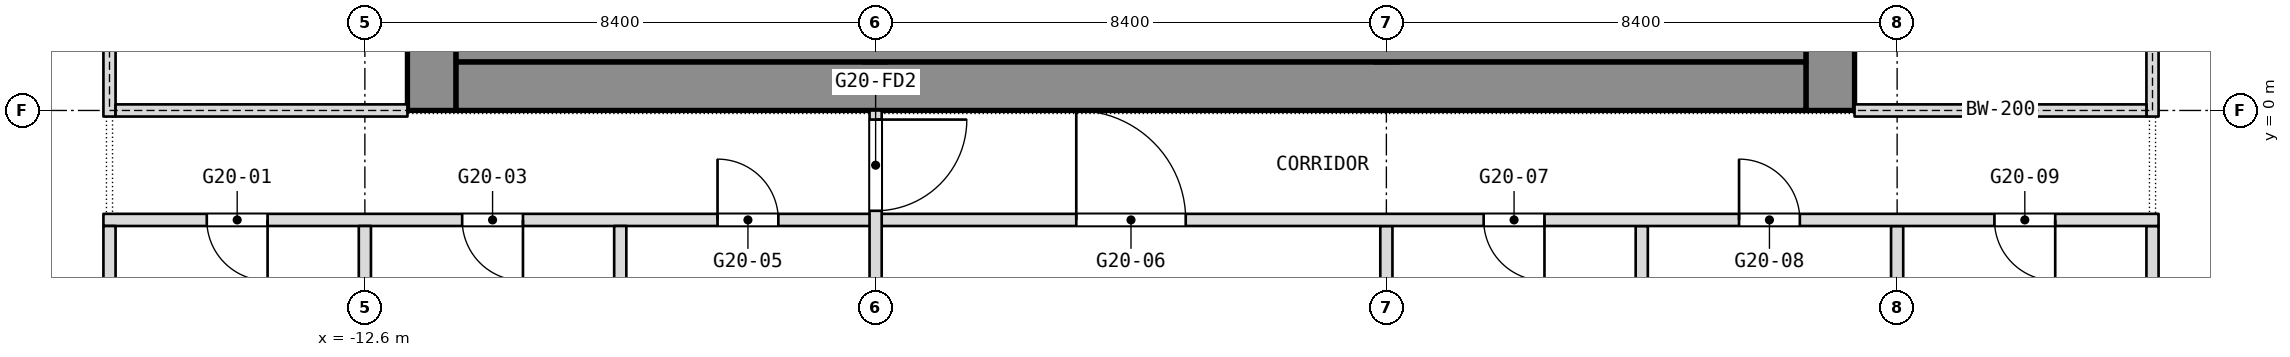
"""IFC4 building model, lengths in metres.
Left out: names, types, materials, properties, quantities, classifications, styles, units other than length and angle.
Written with IfcOpenShell. Run it as: python <this file> out.ifc"""

import sys

from ifc_helpers import new_model, si_unit, direction, frame, frame_2d, origin, place, context, subcontext, project, spatial, rectangle, extrude, element, fill, save


model = new_model("IFC4")
c1 = context("Model", 3, precision=1e-05, world=origin(), true_north=direction((0.0, 1.0)))
c2 = subcontext(c1, "Body", "Model", "MODEL_VIEW")
j1 = project(units=[si_unit("LENGTHUNIT", "METRE"), si_unit("PLANEANGLEUNIT", "RADIAN")], contexts=[c1])
p1 = place(None, origin())
s1 = spatial("IfcSite", under=j1, at=p1, CompositionType="ELEMENT")
p2 = place(p1, origin())
s2 = spatial("IfcBuilding", under=s1, at=p2, CompositionType="ELEMENT")
p3 = place(p2, frame((0.0, 0.0, 230.9)))
s3 = spatial("IfcBuildingStorey", under=s2, at=p3, CompositionType="ELEMENT", Elevation=230.9)
p4 = place(p3, frame((11.5, 0.0, 0.0), z_axis=(0.0, 0.0, 1.0), x_axis=(0.0, 1.0, 0.0)))
e1 = element("IfcWall", 1, at=p4, inside=s3, PredefinedType="SHEAR", context=c2, shape_type="SweptSolid", body=[
    extrude(rectangle(XDim=16.8, YDim=0.8, at=frame_2d((8.4, 0.0))), origin(), (0.0, 0.0, 1.0), 3.6),
])
p5 = place(p4, frame((2.3, 0.0, 0.0)))
e2 = element("IfcOpeningElement", 2, at=p5, cuts=e1, PredefinedType="OPENING", context=c2, shape_type="SweptSolid", body=[
    extrude(rectangle(XDim=1.1, YDim=2.1, at=frame_2d((0.55, 1.05))), frame((0.0, 0.4, 0.0), z_axis=(0.0, -1.0, 0.0), x_axis=(1.0, 0.0, 0.0)), (0.0, 0.0, 1.0), 0.8),
])
p6 = place(p4, frame((4.85, 0.0, 0.0)))
e3 = element("IfcOpeningElement", 3, at=p6, cuts=e1, PredefinedType="OPENING", context=c2, shape_type="SweptSolid", body=[
    extrude(rectangle(XDim=1.1, YDim=2.1, at=frame_2d((0.55, 1.05))), frame((0.0, 0.4, 0.0), z_axis=(0.0, -1.0, 0.0), x_axis=(1.0, 0.0, 0.0)), (0.0, 0.0, 1.0), 0.8),
])
p7 = place(p4, frame((6.825, 0.0, 0.0)))
e4 = element("IfcOpeningElement", 4, at=p7, cuts=e1, PredefinedType="OPENING", context=c2, shape_type="SweptSolid", body=[
    extrude(rectangle(XDim=1.2, YDim=2.1, at=frame_2d((0.6, 1.05))), frame((0.0, 0.4, 0.0), z_axis=(0.0, -1.0, 0.0), x_axis=(1.0, 0.0, 0.0)), (0.0, 0.0, 1.0), 0.8),
])
p8 = place(p4, frame((13.4, 0.0, 0.0)))
e5 = element("IfcOpeningElement", 5, at=p8, cuts=e1, PredefinedType="OPENING", context=c2, shape_type="SweptSolid", body=[
    extrude(rectangle(XDim=1.1, YDim=2.1, at=frame_2d((0.55, 1.05))), frame((0.0, 0.4, 0.0), z_axis=(0.0, -1.0, 0.0), x_axis=(1.0, 0.0, 0.0)), (0.0, 0.0, 1.0), 0.8),
])
p9 = place(p4, frame((10.85, 0.0, 0.0)))
e6 = element("IfcOpeningElement", 6, at=p9, cuts=e1, PredefinedType="OPENING", context=c2, shape_type="SweptSolid", body=[
    extrude(rectangle(XDim=1.1, YDim=2.1, at=frame_2d((0.55, 1.05))), frame((0.0, 0.4, 0.0), z_axis=(0.0, -1.0, 0.0), x_axis=(1.0, 0.0, 0.0)), (0.0, 0.0, 1.0), 0.8),
])
p10 = place(p4, frame((8.775, 0.0, 0.0)))
e7 = element("IfcOpeningElement", 7, at=p10, cuts=e1, PredefinedType="OPENING", context=c2, shape_type="SweptSolid", body=[
    extrude(rectangle(XDim=1.2, YDim=2.1, at=frame_2d((0.6, 1.05))), frame((0.0, 0.4, 0.0), z_axis=(0.0, -1.0, 0.0), x_axis=(1.0, 0.0, 0.0)), (0.0, 0.0, 1.0), 0.8),
])
p11 = place(p3, frame((-11.5, 0.0, 0.0), z_axis=(0.0, 0.0, 1.0), x_axis=(0.0, 1.0, 0.0)))
e8 = element("IfcWall", 8, at=p11, inside=s3, PredefinedType="SHEAR", context=c2, shape_type="SweptSolid", body=[
    extrude(rectangle(XDim=16.8, YDim=0.8, at=frame_2d((8.4, 0.0))), origin(), (0.0, 0.0, 1.0), 3.6),
])
p12 = place(p11, frame((3.6, 0.0, 0.0)))
e9 = element("IfcOpeningElement", 9, at=p12, cuts=e8, PredefinedType="OPENING", context=c2, shape_type="SweptSolid", body=[
    extrude(rectangle(XDim=0.9, YDim=2.1, at=frame_2d((0.45, 1.05))), frame((0.0, 0.4, 0.0), z_axis=(0.0, -1.0, 0.0), x_axis=(1.0, 0.0, 0.0)), (0.0, 0.0, 1.0), 0.8),
])
p13 = place(p11, frame((6.825, 0.0, 0.0)))
e10 = element("IfcOpeningElement", 10, at=p13, cuts=e8, PredefinedType="OPENING", context=c2, shape_type="SweptSolid", body=[
    extrude(rectangle(XDim=1.2, YDim=2.1, at=frame_2d((0.6, 1.05))), frame((0.0, 0.4, 0.0), z_axis=(0.0, -1.0, 0.0), x_axis=(1.0, 0.0, 0.0)), (0.0, 0.0, 1.0), 0.8),
])
p14 = place(p11, frame((14.212, 0.0, 0.0)))
e11 = element("IfcOpeningElement", 11, at=p14, cuts=e8, PredefinedType="OPENING", context=c2, shape_type="SweptSolid", body=[
    extrude(rectangle(XDim=0.9, YDim=2.1, at=frame_2d((0.45, 1.05))), frame((0.0, 0.4, 0.0), z_axis=(0.0, -1.0, 0.0), x_axis=(1.0, 0.0, 0.0)), (0.0, 0.0, 1.0), 0.8),
])
p15 = place(p11, frame((11.587, 0.0, 0.0)))
e12 = element("IfcOpeningElement", 12, at=p15, cuts=e8, PredefinedType="OPENING", context=c2, shape_type="SweptSolid", body=[
    extrude(rectangle(XDim=0.9, YDim=2.1, at=frame_2d((0.45, 1.05))), frame((0.0, 0.4, 0.0), z_axis=(0.0, -1.0, 0.0), x_axis=(1.0, 0.0, 0.0)), (0.0, 0.0, 1.0), 0.8),
])
p16 = place(p11, frame((8.775, 0.0, 0.0)))
e13 = element("IfcOpeningElement", 13, at=p16, cuts=e8, PredefinedType="OPENING", context=c2, shape_type="SweptSolid", body=[
    extrude(rectangle(XDim=1.2, YDim=2.1, at=frame_2d((0.6, 1.05))), frame((0.0, 0.4, 0.0), z_axis=(0.0, -1.0, 0.0), x_axis=(1.0, 0.0, 0.0)), (0.0, 0.0, 1.0), 0.8),
])
p17 = place(p3, frame((-11.1, 0.4, 0.0), z_axis=(0.0, 0.0, 1.0), x_axis=(1.0, 0.0, 0.0)))
e14 = element("IfcWall", 14, at=p17, inside=s3, PredefinedType="SHEAR", context=c2, shape_type="SweptSolid", body=[
    extrude(rectangle(XDim=22.2, YDim=0.8, at=frame_2d((11.1, 0.0))), origin(), (0.0, 0.0, 1.0), 3.6),
])
p18 = place(p3, frame((-4.2, 0.8, 0.0), z_axis=(0.0, 0.0, 1.0), x_axis=(0.0, 1.0, 0.0)))
e15 = element("IfcWall", 15, at=p18, inside=s3, PredefinedType="SHEAR", context=c2, shape_type="SweptSolid", body=[
    extrude(rectangle(XDim=15.2, YDim=0.4, at=frame_2d((7.6, 0.0))), origin(), (0.0, 0.0, 1.0), 3.6),
])
p19 = place(p18, frame((8.5, 0.0, 0.0)))
e16 = element("IfcOpeningElement", 16, at=p19, cuts=e15, PredefinedType="OPENING", context=c2, shape_type="SweptSolid", body=[
    extrude(rectangle(XDim=1.2, YDim=2.1, at=frame_2d((0.6, 1.05))), frame((0.0, 0.2, 0.0), z_axis=(0.0, -1.0, 0.0), x_axis=(1.0, 0.0, 0.0)), (0.0, 0.0, 1.0), 0.4),
])
p20 = place(p3, frame((4.2, 0.8, 0.0), z_axis=(0.0, 0.0, 1.0), x_axis=(0.0, 1.0, 0.0)))
e17 = element("IfcWall", 17, at=p20, inside=s3, PredefinedType="SHEAR", context=c2, shape_type="SweptSolid", body=[
    extrude(rectangle(XDim=15.2, YDim=0.4, at=frame_2d((7.6, 0.0))), origin(), (0.0, 0.0, 1.0), 3.6),
])
p21 = place(p20, frame((5.95, 0.0, 0.0)))
e18 = element("IfcOpeningElement", 18, at=p21, cuts=e17, PredefinedType="OPENING", context=c2, shape_type="SweptSolid", body=[
    extrude(rectangle(XDim=1.2, YDim=2.1, at=frame_2d((0.6, 1.05))), frame((0.0, 0.2, 0.0), z_axis=(0.0, -1.0, 0.0), x_axis=(1.0, 0.0, 0.0)), (0.0, 0.0, 1.0), 0.4),
])
for number, where, z_axis, x_axis in (
    (19, (16.8, -7.8, 0.0), (0.0, 0.0, 1.0), (0.0, 1.0, 0.0)),
    (20, (12.6, -7.8, 0.0), (0.0, 0.0, 1.0), (0.0, 1.0, 0.0)),
):
    element("IfcWall", number, at=place(p3, frame(where, z_axis=z_axis, x_axis=x_axis)), inside=s3, PredefinedType="PARTITIONING", context=c2, shape_type="SweptSolid", body=[
        extrude(rectangle(XDim=5.9, YDim=0.2, at=frame_2d((2.95, 0.0))), origin(), (0.0, 0.0, 1.0), 3.34),
    ])
p22 = place(p3, frame((8.4, -8.0, 0.0), z_axis=(0.0, 0.0, 1.0), x_axis=(0.0, 1.0, 0.0)))
e21 = element("IfcWall", 21, at=p22, inside=s3, PredefinedType="PARTITIONING", context=c2, shape_type="SweptSolid", body=[
    extrude(rectangle(XDim=6.1, YDim=0.2, at=frame_2d((3.05, 0.0))), origin(), (0.0, 0.0, 1.0), 3.34),
])
p23 = place(p3, frame((4.2, -11.6, 0.0), z_axis=(0.0, 0.0, 1.0), x_axis=(0.0, 1.0, 0.0)))
e22 = element("IfcWall", 22, at=p23, inside=s3, PredefinedType="PARTITIONING", context=c2, shape_type="SweptSolid", body=[
    extrude(rectangle(XDim=9.7, YDim=0.2, at=frame_2d((4.85, 0.0))), origin(), (0.0, 0.0, 1.0), 3.34),
])
p24 = place(p3, frame((-16.9, -1.8, 0.0), z_axis=(0.0, 0.0, 1.0), x_axis=(1.0, 0.0, 0.0)))
e23 = element("IfcWall", 23, at=p24, inside=s3, PredefinedType="PARTITIONING", context=c2, shape_type="SweptSolid", body=[
    extrude(rectangle(XDim=33.8, YDim=0.2, at=frame_2d((16.9, 0.0))), origin(), (0.0, 0.0, 1.0), 3.34),
])
p25 = place(p24, frame((1.7, 0.0, 0.0)))
e24 = element("IfcOpeningElement", 24, at=p25, cuts=e23, PredefinedType="OPENING", context=c2, shape_type="SweptSolid", body=[
    extrude(rectangle(XDim=1.0, YDim=2.1, at=frame_2d((0.5, 1.05))), frame((0.0, 0.1, 0.0), z_axis=(0.0, -1.0, 0.0), x_axis=(1.0, 0.0, 0.0)), (0.0, 0.0, 1.0), 0.2),
])
p26 = place(p24, frame((5.9, 0.0, 0.0)))
e25 = element("IfcOpeningElement", 25, at=p26, cuts=e23, PredefinedType="OPENING", context=c2, shape_type="SweptSolid", body=[
    extrude(rectangle(XDim=1.0, YDim=2.1, at=frame_2d((0.5, 1.05))), frame((0.0, 0.1, 0.0), z_axis=(0.0, -1.0, 0.0), x_axis=(1.0, 0.0, 0.0)), (0.0, 0.0, 1.0), 0.2),
])
p27 = place(p24, frame((10.1, 0.0, 0.0)))
e26 = element("IfcOpeningElement", 26, at=p27, cuts=e23, PredefinedType="OPENING", context=c2, shape_type="SweptSolid", body=[
    extrude(rectangle(XDim=1.0, YDim=2.1, at=frame_2d((0.5, 1.05))), frame((0.0, 0.1, 0.0), z_axis=(0.0, -1.0, 0.0), x_axis=(1.0, 0.0, 0.0)), (0.0, 0.0, 1.0), 0.2),
])
p28 = place(p24, frame((16.0, 0.0, 0.0)))
e27 = element("IfcOpeningElement", 27, at=p28, cuts=e23, PredefinedType="OPENING", context=c2, shape_type="SweptSolid", body=[
    extrude(rectangle(XDim=1.8, YDim=2.1, at=frame_2d((0.9, 1.05))), frame((0.0, 0.1, 0.0), z_axis=(0.0, -1.0, 0.0), x_axis=(1.0, 0.0, 0.0)), (0.0, 0.0, 1.0), 0.2),
])
p29 = place(p24, frame((22.7, 0.0, 0.0)))
e28 = element("IfcOpeningElement", 28, at=p29, cuts=e23, PredefinedType="OPENING", context=c2, shape_type="SweptSolid", body=[
    extrude(rectangle(XDim=1.0, YDim=2.1, at=frame_2d((0.5, 1.05))), frame((0.0, 0.1, 0.0), z_axis=(0.0, -1.0, 0.0), x_axis=(1.0, 0.0, 0.0)), (0.0, 0.0, 1.0), 0.2),
])
p30 = place(p24, frame((26.9, 0.0, 0.0)))
e29 = element("IfcOpeningElement", 29, at=p30, cuts=e23, PredefinedType="OPENING", context=c2, shape_type="SweptSolid", body=[
    extrude(rectangle(XDim=1.0, YDim=2.1, at=frame_2d((0.5, 1.05))), frame((0.0, 0.1, 0.0), z_axis=(0.0, -1.0, 0.0), x_axis=(1.0, 0.0, 0.0)), (0.0, 0.0, 1.0), 0.2),
])
p31 = place(p24, frame((31.1, 0.0, 0.0)))
e30 = element("IfcOpeningElement", 30, at=p31, cuts=e23, PredefinedType="OPENING", context=c2, shape_type="SweptSolid", body=[
    extrude(rectangle(XDim=1.0, YDim=2.1, at=frame_2d((0.5, 1.05))), frame((0.0, 0.1, 0.0), z_axis=(0.0, -1.0, 0.0), x_axis=(1.0, 0.0, 0.0)), (0.0, 0.0, 1.0), 0.2),
])
p32 = place(p3, frame((-4.2, -13.6, 0.0), z_axis=(0.0, 0.0, 1.0), x_axis=(0.0, 1.0, 0.0)))
e31 = element("IfcWall", 31, at=p32, inside=s3, PredefinedType="PARTITIONING", context=c2, shape_type="SweptSolid", body=[
    extrude(rectangle(XDim=13.6, YDim=0.2, at=frame_2d((6.8, 0.0))), origin(), (0.0, 0.0, 1.0), 3.34),
])
p33 = place(p32, frame((11.95, 0.0, 0.0)))
e32 = element("IfcOpeningElement", 32, at=p33, cuts=e31, PredefinedType="OPENING", context=c2, shape_type="SweptSolid", body=[
    extrude(rectangle(XDim=1.5, YDim=2.1, at=frame_2d((0.75, 1.05))), frame((0.0, 0.1, 0.0), z_axis=(0.0, -1.0, 0.0), x_axis=(1.0, 0.0, 0.0)), (0.0, 0.0, 1.0), 0.2),
])
p34 = place(p32, frame((0.25, 0.0, 0.0)))
e33 = element("IfcOpeningElement", 33, at=p34, cuts=e31, PredefinedType="OPENING", context=c2, shape_type="SweptSolid", body=[
    extrude(rectangle(XDim=1.5, YDim=2.1, at=frame_2d((0.75, 1.05))), frame((0.0, 0.1, 0.0), z_axis=(0.0, -1.0, 0.0), x_axis=(1.0, 0.0, 0.0)), (0.0, 0.0, 1.0), 0.2),
])
p35 = place(p3, frame((-8.4, -8.0, 0.0), z_axis=(0.0, 0.0, 1.0), x_axis=(0.0, 1.0, 0.0)))
e34 = element("IfcWall", 34, at=p35, inside=s3, PredefinedType="PARTITIONING", context=c2, shape_type="SweptSolid", body=[
    extrude(rectangle(XDim=6.1, YDim=0.2, at=frame_2d((3.05, 0.0))), origin(), (0.0, 0.0, 1.0), 3.34),
])
p36 = place(p3, frame((-12.6, -7.8, 0.0), z_axis=(0.0, 0.0, 1.0), x_axis=(0.0, 1.0, 0.0)))
e35 = element("IfcWall", 35, at=p36, inside=s3, PredefinedType="PARTITIONING", context=c2, shape_type="SweptSolid", body=[
    extrude(rectangle(XDim=5.9, YDim=0.2, at=frame_2d((2.95, 0.0))), origin(), (0.0, 0.0, 1.0), 3.34),
])
p37 = place(p3, frame((-16.8, -8.0, 0.0), z_axis=(0.0, 0.0, 1.0), x_axis=(0.0, 1.0, 0.0)))
e36 = element("IfcWall", 36, at=p37, inside=s3, PredefinedType="PARTITIONING", context=c2, shape_type="SweptSolid", body=[
    extrude(rectangle(XDim=6.1, YDim=0.2, at=frame_2d((3.05, 0.0))), origin(), (0.0, 0.0, 1.0), 3.34),
])
p38 = place(p3, frame((-11.1, 1.15, 0.0), z_axis=(0.0, 0.0, 1.0), x_axis=(1.0, 0.0, 0.0)))
e37 = element("IfcWall", 37, at=p38, inside=s3, PredefinedType="PARTITIONING", context=c2, shape_type="SweptSolid", body=[
    extrude(rectangle(XDim=22.2, YDim=0.7, at=frame_2d((11.1, 0.0))), origin(), (0.0, 0.0, 1.0), 3.34),
])
p39 = place(p3, frame((-16.8, -0.1, 0.0), z_axis=(0.0, 0.0, 1.0), x_axis=(0.0, 1.0, 0.0)))
e38 = element("IfcWall", 38, at=p39, inside=s3, PredefinedType="PARTITIONING", context=c2, shape_type="SweptSolid", body=[
    extrude(rectangle(XDim=17.0, YDim=0.2, at=frame_2d((8.5, 0.0))), origin(), (0.0, 0.0, 1.0), 3.34),
])
p40 = place(p39, frame((2.2, 0.0, 0.0)))
e39 = element("IfcOpeningElement", 39, at=p40, cuts=e38, PredefinedType="OPENING", context=c2, shape_type="SweptSolid", body=[
    extrude(rectangle(XDim=1.8, YDim=2.1, at=frame_2d((0.9, 1.05))), frame((0.0, 0.1, 0.0), z_axis=(0.0, -1.0, 0.0), x_axis=(1.0, 0.0, 0.0)), (0.0, 0.0, 1.0), 0.2),
])
p41 = place(p39, frame((13.0, 0.0, 0.0)))
e40 = element("IfcOpeningElement", 40, at=p41, cuts=e38, PredefinedType="OPENING", context=c2, shape_type="SweptSolid", body=[
    extrude(rectangle(XDim=1.8, YDim=2.1, at=frame_2d((0.9, 1.05))), frame((0.0, 0.1, 0.0), z_axis=(0.0, -1.0, 0.0), x_axis=(1.0, 0.0, 0.0)), (0.0, 0.0, 1.0), 0.2),
])
p42 = place(p3, frame((-16.7, 0.0, 0.0), z_axis=(0.0, 0.0, 1.0), x_axis=(1.0, 0.0, 0.0)))
e41 = element("IfcWall", 41, at=p42, inside=s3, PredefinedType="PARTITIONING", context=c2, shape_type="SweptSolid", body=[
    extrude(rectangle(XDim=4.8, YDim=0.2, at=frame_2d((2.4, 0.0))), origin(), (0.0, 0.0, 1.0), 2.94),
])
p43 = place(p3, frame((16.8, -0.1, 0.0), z_axis=(0.0, 0.0, 1.0), x_axis=(0.0, 1.0, 0.0)))
e42 = element("IfcWall", 42, at=p43, inside=s3, PredefinedType="PARTITIONING", context=c2, shape_type="SweptSolid", body=[
    extrude(rectangle(XDim=17.0, YDim=0.2, at=frame_2d((8.5, 0.0))), origin(), (0.0, 0.0, 1.0), 3.34),
])
p44 = place(p43, frame((2.2, 0.0, 0.0)))
e43 = element("IfcOpeningElement", 43, at=p44, cuts=e42, PredefinedType="OPENING", context=c2, shape_type="SweptSolid", body=[
    extrude(rectangle(XDim=1.8, YDim=2.1, at=frame_2d((0.9, 1.05))), frame((0.0, 0.1, 0.0), z_axis=(0.0, -1.0, 0.0), x_axis=(1.0, 0.0, 0.0)), (0.0, 0.0, 1.0), 0.2),
])
p45 = place(p43, frame((13.0, 0.0, 0.0)))
e44 = element("IfcOpeningElement", 44, at=p45, cuts=e42, PredefinedType="OPENING", context=c2, shape_type="SweptSolid", body=[
    extrude(rectangle(XDim=1.8, YDim=2.1, at=frame_2d((0.9, 1.05))), frame((0.0, 0.1, 0.0), z_axis=(0.0, -1.0, 0.0), x_axis=(1.0, 0.0, 0.0)), (0.0, 0.0, 1.0), 0.2),
])
p46 = place(p3, frame((11.9, 0.0, 0.0), z_axis=(0.0, 0.0, 1.0), x_axis=(1.0, 0.0, 0.0)))
e45 = element("IfcWall", 45, at=p46, inside=s3, PredefinedType="PARTITIONING", context=c2, shape_type="SweptSolid", body=[
    extrude(rectangle(XDim=4.8, YDim=0.2, at=frame_2d((2.4, 0.0))), origin(), (0.0, 0.0, 1.0), 2.94),
])
p47 = place(p25, origin())
e46 = element("IfcDoor", 46, at=p47, inside=s3, OperationType="SINGLE_SWING_LEFT", PredefinedType="DOOR", context=c2, shape_type="SweptSolid", body=[
    extrude(rectangle(XDim=1.0, YDim=2.1, at=frame_2d((0.5, 1.05))), frame((0.0, 0.025, 0.0), z_axis=(0.0, -1.0, 0.0), x_axis=(1.0, 0.0, 0.0)), (0.0, 0.0, 1.0), 0.05),
])
fill(e24, e46)
p48 = place(p26, origin())
e47 = element("IfcDoor", 47, at=p48, inside=s3, OperationType="SINGLE_SWING_LEFT", PredefinedType="DOOR", context=c2, shape_type="SweptSolid", body=[
    extrude(rectangle(XDim=1.0, YDim=2.1, at=frame_2d((0.5, 1.05))), frame((0.0, 0.025, 0.0), z_axis=(0.0, -1.0, 0.0), x_axis=(1.0, 0.0, 0.0)), (0.0, 0.0, 1.0), 0.05),
])
fill(e25, e47)
p49 = place(p27, origin())
e48 = element("IfcDoor", 48, at=p49, inside=s3, OperationType="SINGLE_SWING_RIGHT", PredefinedType="DOOR", context=c2, shape_type="SweptSolid", body=[
    extrude(rectangle(XDim=1.0, YDim=2.1, at=frame_2d((0.5, 1.05))), frame((0.0, 0.025, 0.0), z_axis=(0.0, -1.0, 0.0), x_axis=(1.0, 0.0, 0.0)), (0.0, 0.0, 1.0), 0.05),
])
fill(e26, e48)
p50 = place(p28, origin())
e49 = element("IfcDoor", 49, at=p50, inside=s3, OperationType="DOUBLE_DOOR_SINGLE_SWING", PredefinedType="DOOR", context=c2, shape_type="SweptSolid", body=[
    extrude(rectangle(XDim=1.8, YDim=2.1, at=frame_2d((0.9, 1.05))), frame((0.0, 0.025, 0.0), z_axis=(0.0, -1.0, 0.0), x_axis=(1.0, 0.0, 0.0)), (0.0, 0.0, 1.0), 0.05),
])
fill(e27, e49)
p51 = place(p29, origin())
e50 = element("IfcDoor", 50, at=p51, inside=s3, OperationType="SINGLE_SWING_RIGHT", PredefinedType="DOOR", context=c2, shape_type="SweptSolid", body=[
    extrude(rectangle(XDim=1.0, YDim=2.1, at=frame_2d((0.5, 1.05))), frame((0.0, 0.025, 0.0), z_axis=(0.0, -1.0, 0.0), x_axis=(1.0, 0.0, 0.0)), (0.0, 0.0, 1.0), 0.05),
])
fill(e28, e50)
p52 = place(p30, origin())
e51 = element("IfcDoor", 51, at=p52, inside=s3, OperationType="SINGLE_SWING_LEFT", PredefinedType="DOOR", context=c2, shape_type="SweptSolid", body=[
    extrude(rectangle(XDim=1.0, YDim=2.1, at=frame_2d((0.5, 1.05))), frame((0.0, 0.025, 0.0), z_axis=(0.0, -1.0, 0.0), x_axis=(1.0, 0.0, 0.0)), (0.0, 0.0, 1.0), 0.05),
])
fill(e29, e51)
p53 = place(p31, origin())
e52 = element("IfcDoor", 52, at=p53, inside=s3, OperationType="SINGLE_SWING_RIGHT", PredefinedType="DOOR", context=c2, shape_type="SweptSolid", body=[
    extrude(rectangle(XDim=1.0, YDim=2.1, at=frame_2d((0.5, 1.05))), frame((0.0, 0.025, 0.0), z_axis=(0.0, -1.0, 0.0), x_axis=(1.0, 0.0, 0.0)), (0.0, 0.0, 1.0), 0.05),
])
fill(e30, e52)
p54 = place(p33, origin())
e53 = element("IfcDoor", 53, at=p54, inside=s3, OperationType="DOUBLE_DOOR_DOUBLE_SWING", PredefinedType="DOOR", context=c2, shape_type="SweptSolid", body=[
    extrude(rectangle(XDim=1.5, YDim=2.1, at=frame_2d((0.75, 1.05))), frame((0.0, 0.025, 0.0), z_axis=(0.0, -1.0, 0.0), x_axis=(1.0, 0.0, 0.0)), (0.0, 0.0, 1.0), 0.05),
])
fill(e32, e53)
save(model, sys.argv[1])
